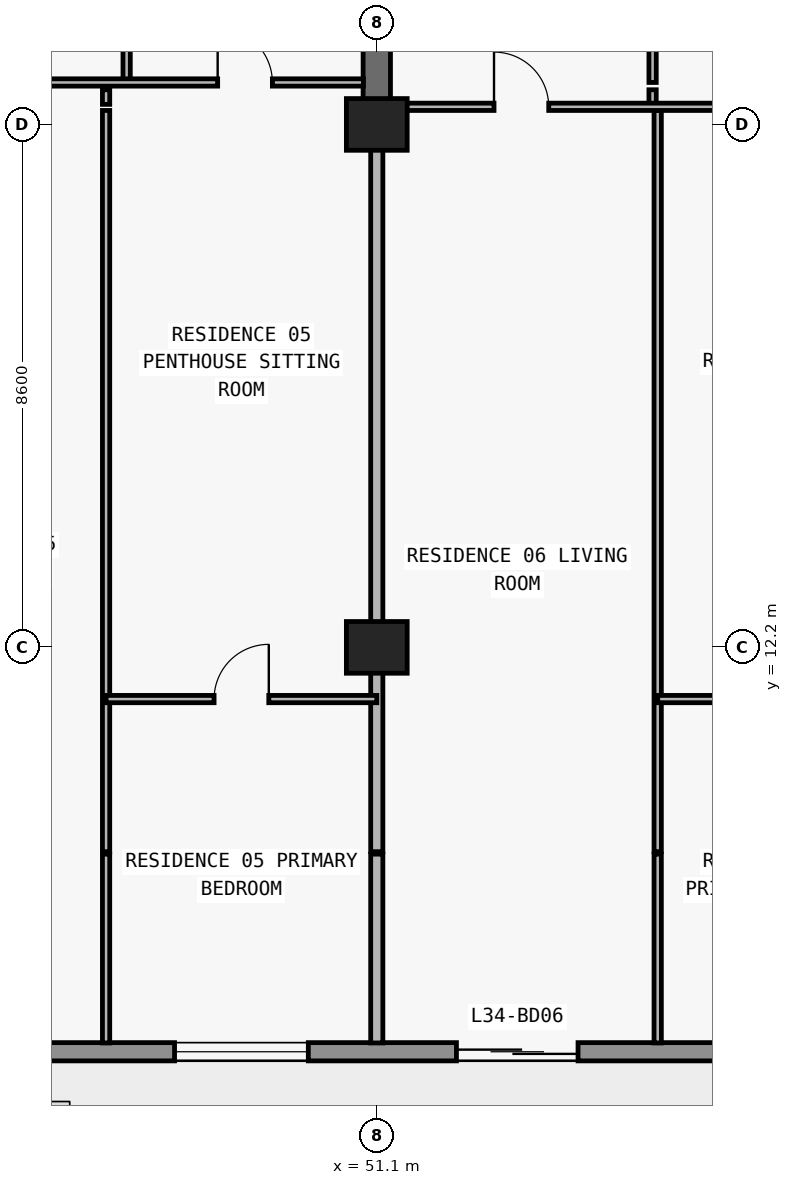
"""IFC4 building model, lengths in metres.
Left out: names, types, materials, properties, quantities, classifications, styles, units other than length and angle.
Written with IfcOpenShell. Run it as: python <this file> out.ifc"""

import sys

from ifc_helpers import new_model, si_unit, direction, frame, frame_2d, origin, origin_2d, place, context, subcontext, project, spatial, rectangle, extrude, element, fill, save


model = new_model("IFC4")
c1 = context("Model", 3, precision=1e-05, world=origin(), true_north=direction((0.0, 1.0)))
c2 = subcontext(c1, "Body", "Model", "MODEL_VIEW")
j1 = project(units=[si_unit("LENGTHUNIT", "METRE"), si_unit("PLANEANGLEUNIT", "RADIAN")], contexts=[c1])
p1 = place(None, origin())
s1 = spatial("IfcSite", under=j1, at=p1, CompositionType="ELEMENT")
p2 = place(p1, origin())
s2 = spatial("IfcBuilding", under=s1, at=p2, CompositionType="ELEMENT")
p3 = place(p2, frame((0.0, 0.0, 125.7)))
s3 = spatial("IfcBuildingStorey", under=s2, at=p3, CompositionType="ELEMENT", Elevation=125.7)
for number, where, z_axis, x_axis in (
    (1, (51.1, 12.2, 0.0), (0.0, 0.0, 1.0), (1.0, 0.0, 0.0)),
    (2, (51.1, 20.8, 0.0), (0.0, 0.0, 1.0), (1.0, 0.0, 0.0)),
):
    element("IfcColumn", number, at=place(p3, frame(where, z_axis=z_axis, x_axis=x_axis)), inside=s3, PredefinedType="COLUMN", context=c2, shape_type="SweptSolid", body=[
        extrude(rectangle(XDim=1.0, YDim=0.85, at=origin_2d()), origin(), (0.0, 0.0, 1.0), 3.05),
    ])
p4 = place(p3, frame((51.1, 20.8, 0.0), z_axis=(0.0, 0.0, 1.0), x_axis=(0.0, 1.0, 0.0)))
e3 = element("IfcWall", 3, at=p4, inside=s3, PredefinedType="SHEAR", context=c2, shape_type="SweptSolid", body=[
    extrude(rectangle(XDim=8.6, YDim=0.45, at=frame_2d((4.3, 0.0))), origin(), (0.0, 0.0, 1.0), 3.05),
])
p5 = place(p3, frame((70.1, 5.55, 0.0), z_axis=(0.0, 0.0, 1.0), x_axis=(-1.0, 0.0, 0.0)))
e4 = element("IfcWall", 4, at=p5, inside=s3, PredefinedType="STANDARD", context=c2, shape_type="SweptSolid", body=[
    extrude(rectangle(XDim=62.4, YDim=0.3, at=frame_2d((31.2, 0.0))), origin(), (0.0, 0.0, 1.0), 3.05),
])
p6 = place(p5, frame((57.226, 0.0, 0.0)))
e5 = element("IfcOpeningElement", 5, at=p6, cuts=e4, PredefinedType="OPENING", context=c2, shape_type="SweptSolid", body=[
    extrude(rectangle(XDim=2.0, YDim=2.3, at=frame_2d((1.0, 1.15))), frame((0.0, 0.16, 0.0), z_axis=(0.0, -1.0, 0.0), x_axis=(1.0, 0.0, 0.0)), (0.0, 0.0, 1.0), 0.32),
])
p7 = place(p5, frame((52.926, 0.0, 0.85)))
e6 = element("IfcOpeningElement", 6, at=p7, cuts=e4, PredefinedType="OPENING", context=c2, shape_type="SweptSolid", body=[
    extrude(rectangle(XDim=2.2, YDim=1.55, at=frame_2d((1.1, 0.775))), frame((0.0, 0.16, 0.0), z_axis=(0.0, -1.0, 0.0), x_axis=(1.0, 0.0, 0.0)), (0.0, 0.0, 1.0), 0.32),
])
p8 = place(p5, frame((48.49, 0.0, 0.0)))
e7 = element("IfcOpeningElement", 7, at=p8, cuts=e4, PredefinedType="OPENING", context=c2, shape_type="SweptSolid", body=[
    extrude(rectangle(XDim=2.0, YDim=2.3, at=frame_2d((1.0, 1.15))), frame((0.0, 0.16, 0.0), z_axis=(0.0, -1.0, 0.0), x_axis=(1.0, 0.0, 0.0)), (0.0, 0.0, 1.0), 0.32),
])
p9 = place(p5, frame((44.39, 0.0, 0.85)))
e8 = element("IfcOpeningElement", 8, at=p9, cuts=e4, PredefinedType="OPENING", context=c2, shape_type="SweptSolid", body=[
    extrude(rectangle(XDim=1.8, YDim=1.55, at=frame_2d((0.9, 0.775))), frame((0.0, 0.16, 0.0), z_axis=(0.0, -1.0, 0.0), x_axis=(1.0, 0.0, 0.0)), (0.0, 0.0, 1.0), 0.32),
])
p10 = place(p5, frame((40.426, 0.0, 0.0)))
e9 = element("IfcOpeningElement", 9, at=p10, cuts=e4, PredefinedType="OPENING", context=c2, shape_type="SweptSolid", body=[
    extrude(rectangle(XDim=2.0, YDim=2.3, at=frame_2d((1.0, 1.15))), frame((0.0, 0.16, 0.0), z_axis=(0.0, -1.0, 0.0), x_axis=(1.0, 0.0, 0.0)), (0.0, 0.0, 1.0), 0.32),
])
p11 = place(p5, frame((36.126, 0.0, 0.85)))
e10 = element("IfcOpeningElement", 10, at=p11, cuts=e4, PredefinedType="OPENING", context=c2, shape_type="SweptSolid", body=[
    extrude(rectangle(XDim=2.2, YDim=1.55, at=frame_2d((1.1, 0.775))), frame((0.0, 0.16, 0.0), z_axis=(0.0, -1.0, 0.0), x_axis=(1.0, 0.0, 0.0)), (0.0, 0.0, 1.0), 0.32),
])
p12 = place(p5, frame((31.91, 0.0, 0.0)))
e11 = element("IfcOpeningElement", 11, at=p12, cuts=e4, PredefinedType="OPENING", context=c2, shape_type="SweptSolid", body=[
    extrude(rectangle(XDim=2.0, YDim=2.3, at=frame_2d((1.0, 1.15))), frame((0.0, 0.16, 0.0), z_axis=(0.0, -1.0, 0.0), x_axis=(1.0, 0.0, 0.0)), (0.0, 0.0, 1.0), 0.32),
])
p13 = place(p5, frame((28.21, 0.0, 0.85)))
e12 = element("IfcOpeningElement", 12, at=p13, cuts=e4, PredefinedType="OPENING", context=c2, shape_type="SweptSolid", body=[
    extrude(rectangle(XDim=1.8, YDim=1.55, at=frame_2d((0.9, 0.775))), frame((0.0, 0.16, 0.0), z_axis=(0.0, -1.0, 0.0), x_axis=(1.0, 0.0, 0.0)), (0.0, 0.0, 1.0), 0.32),
])
p14 = place(p5, frame((24.426, 0.0, 0.0)))
e13 = element("IfcOpeningElement", 13, at=p14, cuts=e4, PredefinedType="OPENING", context=c2, shape_type="SweptSolid", body=[
    extrude(rectangle(XDim=2.0, YDim=2.3, at=frame_2d((1.0, 1.15))), frame((0.0, 0.16, 0.0), z_axis=(0.0, -1.0, 0.0), x_axis=(1.0, 0.0, 0.0)), (0.0, 0.0, 1.0), 0.32),
])
p15 = place(p5, frame((20.126, 0.0, 0.85)))
e14 = element("IfcOpeningElement", 14, at=p15, cuts=e4, PredefinedType="OPENING", context=c2, shape_type="SweptSolid", body=[
    extrude(rectangle(XDim=2.2, YDim=1.55, at=frame_2d((1.1, 0.775))), frame((0.0, 0.16, 0.0), z_axis=(0.0, -1.0, 0.0), x_axis=(1.0, 0.0, 0.0)), (0.0, 0.0, 1.0), 0.32),
])
p16 = place(p5, frame((15.69, 0.0, 0.0)))
e15 = element("IfcOpeningElement", 15, at=p16, cuts=e4, PredefinedType="OPENING", context=c2, shape_type="SweptSolid", body=[
    extrude(rectangle(XDim=2.0, YDim=2.3, at=frame_2d((1.0, 1.15))), frame((0.0, 0.16, 0.0), z_axis=(0.0, -1.0, 0.0), x_axis=(1.0, 0.0, 0.0)), (0.0, 0.0, 1.0), 0.32),
])
p17 = place(p5, frame((11.59, 0.0, 0.85)))
e16 = element("IfcOpeningElement", 16, at=p17, cuts=e4, PredefinedType="OPENING", context=c2, shape_type="SweptSolid", body=[
    extrude(rectangle(XDim=1.8, YDim=1.55, at=frame_2d((0.9, 0.775))), frame((0.0, 0.16, 0.0), z_axis=(0.0, -1.0, 0.0), x_axis=(1.0, 0.0, 0.0)), (0.0, 0.0, 1.0), 0.32),
])
p18 = place(p5, frame((7.626, 0.0, 0.0)))
e17 = element("IfcOpeningElement", 17, at=p18, cuts=e4, PredefinedType="OPENING", context=c2, shape_type="SweptSolid", body=[
    extrude(rectangle(XDim=2.0, YDim=2.3, at=frame_2d((1.0, 1.15))), frame((0.0, 0.16, 0.0), z_axis=(0.0, -1.0, 0.0), x_axis=(1.0, 0.0, 0.0)), (0.0, 0.0, 1.0), 0.32),
])
p19 = place(p5, frame((3.326, 0.0, 0.85)))
e18 = element("IfcOpeningElement", 18, at=p19, cuts=e4, PredefinedType="OPENING", context=c2, shape_type="SweptSolid", body=[
    extrude(rectangle(XDim=2.2, YDim=1.55, at=frame_2d((1.1, 0.775))), frame((0.0, 0.16, 0.0), z_axis=(0.0, -1.0, 0.0), x_axis=(1.0, 0.0, 0.0)), (0.0, 0.0, 1.0), 0.32),
])
p20 = place(p3, frame((46.648, 5.695, 0.0), z_axis=(0.0, 0.0, 1.0), x_axis=(0.0, 1.0, 0.0)))
e19 = element("IfcWall", 19, at=p20, inside=s3, PredefinedType="PARTITIONING", context=c2, shape_type="SweptSolid", body=[
    extrude(rectangle(XDim=3.105, YDim=0.12, at=frame_2d((1.552, 0.0))), origin(), (0.0, 0.0, 1.0), 3.05),
])
p21 = place(p3, frame((46.648, 8.84, 0.0), z_axis=(0.0, 0.0, 1.0), x_axis=(0.0, 1.0, 0.0)))
e20 = element("IfcWall", 20, at=p21, inside=s3, PredefinedType="PARTITIONING", context=c2, shape_type="SweptSolid", body=[
    extrude(rectangle(XDim=12.19, YDim=0.12, at=frame_2d((6.095, 0.0))), origin(), (0.0, 0.0, 1.0), 3.05),
])
p22 = place(p3, frame((46.648, 21.13, 0.0), z_axis=(0.0, 0.0, 1.0), x_axis=(0.0, 1.0, 0.0)))
e21 = element("IfcWall", 21, at=p22, inside=s3, PredefinedType="PARTITIONING", context=c2, shape_type="SweptSolid", body=[
    extrude(rectangle(XDim=0.24, YDim=0.12, at=frame_2d((0.12, 0.0))), origin(), (0.0, 0.0, 1.0), 3.05),
])
p23 = place(p3, frame((46.986, 21.49, 0.0), z_axis=(0.0, 0.0, 1.0), x_axis=(0.0, 1.0, 0.0)))
e22 = element("IfcWall", 22, at=p23, inside=s3, PredefinedType="PARTITIONING", context=c2, shape_type="SweptSolid", body=[
    extrude(rectangle(XDim=4.69, YDim=0.12, at=frame_2d((2.345, 0.0))), origin(), (0.0, 0.0, 1.0), 3.05),
])
p24 = place(p23, frame((1.895, 0.0, 0.0)))
e23 = element("IfcOpeningElement", 23, at=p24, cuts=e22, PredefinedType="OPENING", context=c2, shape_type="SweptSolid", body=[
    extrude(rectangle(XDim=0.9, YDim=2.15, at=frame_2d((0.45, 1.075))), frame((0.0, 0.07, 0.0), z_axis=(0.0, -1.0, 0.0), x_axis=(1.0, 0.0, 0.0)), (0.0, 0.0, 1.0), 0.14),
])
p25 = place(p3, frame((51.1, 5.695, 0.0), z_axis=(0.0, 0.0, 1.0), x_axis=(0.0, 1.0, 0.0)))
e24 = element("IfcWall", 24, at=p25, inside=s3, PredefinedType="PARTITIONING", context=c2, shape_type="SweptSolid", body=[
    extrude(rectangle(XDim=3.105, YDim=0.2, at=frame_2d((1.552, 0.0))), origin(), (0.0, 0.0, 1.0), 3.05),
])
p26 = place(p3, frame((51.1, 8.84, 0.0), z_axis=(0.0, 0.0, 1.0), x_axis=(0.0, 1.0, 0.0)))
e25 = element("IfcWall", 25, at=p26, inside=s3, PredefinedType="PARTITIONING", context=c2, shape_type="SweptSolid", body=[
    extrude(rectangle(XDim=11.955, YDim=0.2, at=frame_2d((5.978, 0.0))), origin(), (0.0, 0.0, 1.0), 2.174),
])
p27 = place(p3, frame((55.636, 21.13, 0.0), z_axis=(0.0, 0.0, 1.0), x_axis=(0.0, 1.0, 0.0)))
e26 = element("IfcWall", 26, at=p27, inside=s3, PredefinedType="PARTITIONING", context=c2, shape_type="SweptSolid", body=[
    extrude(rectangle(XDim=0.24, YDim=0.12, at=frame_2d((0.12, 0.0))), origin(), (0.0, 0.0, 1.0), 3.05),
])
p28 = place(p3, frame((55.636, 21.49, 0.0), z_axis=(0.0, 0.0, 1.0), x_axis=(0.0, 1.0, 0.0)))
e27 = element("IfcWall", 27, at=p28, inside=s3, PredefinedType="PARTITIONING", context=c2, shape_type="SweptSolid", body=[
    extrude(rectangle(XDim=4.69, YDim=0.12, at=frame_2d((2.345, 0.0))), origin(), (0.0, 0.0, 1.0), 3.05),
])
p29 = place(p28, frame((1.895, 0.0, 0.0)))
e28 = element("IfcOpeningElement", 28, at=p29, cuts=e27, PredefinedType="OPENING", context=c2, shape_type="SweptSolid", body=[
    extrude(rectangle(XDim=0.9, YDim=2.15, at=frame_2d((0.45, 1.075))), frame((0.0, 0.07, 0.0), z_axis=(0.0, -1.0, 0.0), x_axis=(1.0, 0.0, 0.0)), (0.0, 0.0, 1.0), 0.14),
])
p30 = place(p3, frame((55.72, 5.695, 0.0), z_axis=(0.0, 0.0, 1.0), x_axis=(0.0, 1.0, 0.0)))
e29 = element("IfcWall", 29, at=p30, inside=s3, PredefinedType="PARTITIONING", context=c2, shape_type="SweptSolid", body=[
    extrude(rectangle(XDim=3.105, YDim=0.12, at=frame_2d((1.552, 0.0))), origin(), (0.0, 0.0, 1.0), 3.05),
])
p31 = place(p3, frame((55.72, 8.84, 0.0), z_axis=(0.0, 0.0, 1.0), x_axis=(0.0, 1.0, 0.0)))
e30 = element("IfcWall", 30, at=p31, inside=s3, PredefinedType="PARTITIONING", context=c2, shape_type="SweptSolid", body=[
    extrude(rectangle(XDim=12.19, YDim=0.12, at=frame_2d((6.095, 0.0))), origin(), (0.0, 0.0, 1.0), 3.05),
])
p32 = place(p3, frame((46.648, 11.35, 0.0), z_axis=(0.0, 0.0, 1.0), x_axis=(1.0, 0.0, 0.0)))
e31 = element("IfcWall", 31, at=p32, inside=s3, PredefinedType="PARTITIONING", context=c2, shape_type="SweptSolid", body=[
    extrude(rectangle(XDim=4.452, YDim=0.12, at=frame_2d((2.226, 0.0))), origin(), (0.0, 0.0, 1.0), 3.05),
])
p33 = place(p32, frame((1.776, 0.0, 0.0)))
e32 = element("IfcOpeningElement", 32, at=p33, cuts=e31, PredefinedType="OPENING", context=c2, shape_type="SweptSolid", body=[
    extrude(rectangle(XDim=0.9, YDim=2.15, at=frame_2d((0.45, 1.075))), frame((0.0, 0.07, 0.0), z_axis=(0.0, -1.0, 0.0), x_axis=(1.0, 0.0, 0.0)), (0.0, 0.0, 1.0), 0.14),
])
p34 = place(p3, frame((55.72, 11.35, 0.0), z_axis=(0.0, 0.0, 1.0), x_axis=(1.0, 0.0, 0.0)))
e33 = element("IfcWall", 33, at=p34, inside=s3, PredefinedType="PARTITIONING", context=c2, shape_type="SweptSolid", body=[
    extrude(rectangle(XDim=3.78, YDim=0.12, at=frame_2d((1.89, 0.0))), origin(), (0.0, 0.0, 1.0), 3.05),
])
p35 = place(p34, frame((1.44, 0.0, 0.0)))
e34 = element("IfcOpeningElement", 34, at=p35, cuts=e33, PredefinedType="OPENING", context=c2, shape_type="SweptSolid", body=[
    extrude(rectangle(XDim=0.9, YDim=2.15, at=frame_2d((0.45, 1.075))), frame((0.0, 0.07, 0.0), z_axis=(0.0, -1.0, 0.0), x_axis=(1.0, 0.0, 0.0)), (0.0, 0.0, 1.0), 0.14),
])
p36 = place(p3, frame((51.32, 21.09, 0.0), z_axis=(0.0, 0.0, 1.0), x_axis=(1.0, 0.0, 0.0)))
e35 = element("IfcWall", 35, at=p36, inside=s3, PredefinedType="PARTITIONING", context=c2, shape_type="SweptSolid", body=[
    extrude(rectangle(XDim=8.18, YDim=0.12, at=frame_2d((4.09, 0.0))), origin(), (0.0, 0.0, 1.0), 2.174),
])
p37 = place(p36, frame((1.708, 0.0, 0.0)))
e36 = element("IfcOpeningElement", 36, at=p37, cuts=e35, PredefinedType="OPENING", context=c2, shape_type="SweptSolid", body=[
    extrude(rectangle(XDim=0.9, YDim=2.124, at=frame_2d((0.45, 1.062))), frame((0.0, 0.07, 0.0), z_axis=(0.0, -1.0, 0.0), x_axis=(1.0, 0.0, 0.0)), (0.0, 0.0, 1.0), 0.14),
])
p38 = place(p36, frame((5.84, 0.0, 0.0)))
e37 = element("IfcOpeningElement", 37, at=p38, cuts=e35, PredefinedType="OPENING", context=c2, shape_type="SweptSolid", body=[
    extrude(rectangle(XDim=0.9, YDim=2.124, at=frame_2d((0.45, 1.062))), frame((0.0, 0.07, 0.0), z_axis=(0.0, -1.0, 0.0), x_axis=(1.0, 0.0, 0.0)), (0.0, 0.0, 1.0), 0.14),
])
p39 = place(p3, frame((42.7, 21.49, 0.0), z_axis=(0.0, 0.0, 1.0), x_axis=(1.0, 0.0, 0.0)))
e38 = element("IfcWall", 38, at=p39, inside=s3, PredefinedType="PARTITIONING", context=c2, shape_type="SweptSolid", body=[
    extrude(rectangle(XDim=8.18, YDim=0.12, at=frame_2d((4.09, 0.0))), origin(), (0.0, 0.0, 1.0), 3.05),
])
p40 = place(p39, frame((1.524, 0.0, 0.0)))
e39 = element("IfcOpeningElement", 39, at=p40, cuts=e38, PredefinedType="OPENING", context=c2, shape_type="SweptSolid", body=[
    extrude(rectangle(XDim=0.9, YDim=2.15, at=frame_2d((0.45, 1.075))), frame((0.0, 0.07, 0.0), z_axis=(0.0, -1.0, 0.0), x_axis=(1.0, 0.0, 0.0)), (0.0, 0.0, 1.0), 0.14),
])
p41 = place(p39, frame((5.783, 0.0, 0.0)))
e40 = element("IfcOpeningElement", 40, at=p41, cuts=e38, PredefinedType="OPENING", context=c2, shape_type="SweptSolid", body=[
    extrude(rectangle(XDim=0.9, YDim=2.15, at=frame_2d((0.45, 1.075))), frame((0.0, 0.07, 0.0), z_axis=(0.0, -1.0, 0.0), x_axis=(1.0, 0.0, 0.0)), (0.0, 0.0, 1.0), 0.14),
])
p42 = place(p15, origin())
e41 = element("IfcWindow", 41, at=p42, inside=s3, PartitioningType="SINGLE_PANEL", PredefinedType="WINDOW", context=c2, shape_type="SweptSolid", body=[
    extrude(rectangle(XDim=2.2, YDim=1.55, at=frame_2d((1.1, 0.775))), frame((0.0, 0.03, 0.0), z_axis=(0.0, -1.0, 0.0), x_axis=(1.0, 0.0, 0.0)), (0.0, 0.0, 1.0), 0.06),
])
fill(e14, e41)
p43 = place(p16, origin())
e42 = element("IfcDoor", 42, at=p43, inside=s3, OperationType="DOUBLE_DOOR_SLIDING", PredefinedType="DOOR", context=c2, shape_type="SweptSolid", body=[
    extrude(rectangle(XDim=2.0, YDim=2.3, at=frame_2d((1.0, 1.15))), frame((0.0, 0.025, 0.0), z_axis=(0.0, -1.0, 0.0), x_axis=(1.0, 0.0, 0.0)), (0.0, 0.0, 1.0), 0.05),
])
fill(e15, e42)
p44 = place(p41, origin())
e43 = element("IfcDoor", 43, at=p44, inside=s3, OperationType="SINGLE_SWING_LEFT", PredefinedType="DOOR", context=c2, shape_type="SweptSolid", body=[
    extrude(rectangle(XDim=0.9, YDim=2.15, at=frame_2d((0.45, 1.075))), frame((0.0, 0.025, 0.0), z_axis=(0.0, -1.0, 0.0), x_axis=(1.0, 0.0, 0.0)), (0.0, 0.0, 1.0), 0.05),
])
fill(e40, e43)
p45 = place(p33, origin())
e44 = element("IfcDoor", 44, at=p45, inside=s3, OperationType="SINGLE_SWING_RIGHT", PredefinedType="DOOR", context=c2, shape_type="SweptSolid", body=[
    extrude(rectangle(XDim=0.9, YDim=2.15, at=frame_2d((0.45, 1.075))), frame((0.0, 0.025, 0.0), z_axis=(0.0, -1.0, 0.0), x_axis=(1.0, 0.0, 0.0)), (0.0, 0.0, 1.0), 0.05),
])
fill(e32, e44)
p46 = place(p37, origin())
e45 = element("IfcDoor", 45, at=p46, inside=s3, OperationType="SINGLE_SWING_LEFT", PredefinedType="DOOR", context=c2, shape_type="SweptSolid", body=[
    extrude(rectangle(XDim=0.9, YDim=2.124, at=frame_2d((0.45, 1.062))), frame((0.0, 0.025, 0.0), z_axis=(0.0, -1.0, 0.0), x_axis=(1.0, 0.0, 0.0)), (0.0, 0.0, 1.0), 0.05),
])
fill(e36, e45)
save(model, sys.argv[1])
